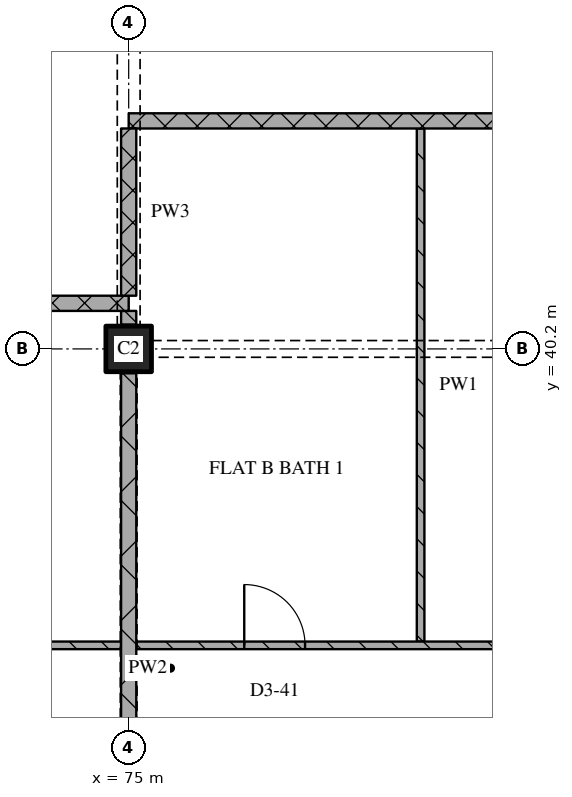
"""IFC4 building model, lengths in metres.
Left out: names, types, materials, properties, quantities, classifications, styles, units other than length and angle.
Written with IfcOpenShell. Run it as: python <this file> out.ifc"""

import sys

from ifc_helpers import new_model, si_unit, direction, frame, frame_2d, origin, origin_2d, place, context, subcontext, project, spatial, rectangle, extrude, element, fill, save


model = new_model("IFC4")
c1 = context("Model", 3, precision=1e-05, world=origin(), true_north=direction((0.0, 1.0)))
c2 = subcontext(c1, "Body", "Model", "MODEL_VIEW")
j1 = project(units=[si_unit("LENGTHUNIT", "METRE"), si_unit("PLANEANGLEUNIT", "RADIAN")], contexts=[c1])
p1 = place(None, origin())
s1 = spatial("IfcSite", under=j1, at=p1, CompositionType="ELEMENT")
p2 = place(p1, origin())
s2 = spatial("IfcBuilding", under=s1, at=p2, CompositionType="ELEMENT")
p3 = place(p2, frame((0.0, 0.0, 230.7)))
s3 = spatial("IfcBuildingStorey", under=s2, at=p3, CompositionType="ELEMENT", Elevation=230.7)
p4 = place(p3, frame((75.0, 40.2, 0.0), z_axis=(0.0, 0.0, 1.0), x_axis=(1.0, 0.0, 0.0)))
e1 = element("IfcColumn", 1, at=p4, inside=s3, PredefinedType="COLUMN", context=c2, shape_type="SweptSolid", body=[
    extrude(rectangle(XDim=0.6, YDim=0.6, at=origin_2d()), origin(), (0.0, 0.0, 1.0), 3.6),
])
p5 = place(p3, frame((75.0, 40.8, 0.0), z_axis=(0.0, 0.0, 1.0), x_axis=(-1.0, 0.0, 0.0)))
e2 = element("IfcWall", 2, at=p5, inside=s3, PredefinedType="PARTITIONING", context=c2, shape_type="SweptSolid", body=[
    extrude(rectangle(XDim=24.38, YDim=0.2, at=frame_2d((12.19, 0.0))), origin(), (0.0, 0.0, 1.0), 3.32),
])
p6 = place(p5, frame((13.45, 0.0, 0.0)))
e3 = element("IfcOpeningElement", 3, at=p6, cuts=e2, PredefinedType="OPENING", context=c2, shape_type="SweptSolid", body=[
    extrude(rectangle(XDim=1.0, YDim=2.1, at=frame_2d((0.5, 1.05))), frame((0.0, 0.11, 0.0), z_axis=(0.0, -1.0, 0.0), x_axis=(1.0, 0.0, 0.0)), (0.0, 0.0, 1.0), 0.22),
])
p7 = place(p3, frame((100.2, 43.2, 0.0), z_axis=(0.0, 0.0, 1.0), x_axis=(-1.0, 0.0, 0.0)))
e4 = element("IfcWall", 4, at=p7, inside=s3, PredefinedType="PARTITIONING", context=c2, shape_type="SweptSolid", body=[
    extrude(rectangle(XDim=25.2, YDim=0.2, at=frame_2d((12.6, 0.0))), origin(), (0.0, 0.0, 1.0), 3.32),
])
p8 = place(p7, frame((13.45, 0.0, 0.0)))
e5 = element("IfcOpeningElement", 5, at=p8, cuts=e4, PredefinedType="OPENING", context=c2, shape_type="SweptSolid", body=[
    extrude(rectangle(XDim=1.0, YDim=2.1, at=frame_2d((0.5, 1.05))), frame((0.0, 0.11, 0.0), z_axis=(0.0, -1.0, 0.0), x_axis=(1.0, 0.0, 0.0)), (0.0, 0.0, 1.0), 0.22),
])
p9 = place(p3, frame((75.0, 43.1, 0.0), z_axis=(0.0, 0.0, 1.0), x_axis=(0.0, -1.0, 0.0)))
e6 = element("IfcWall", 6, at=p9, inside=s3, PredefinedType="PARTITIONING", context=c2, shape_type="SweptSolid", body=[
    extrude(rectangle(XDim=2.2, YDim=0.2, at=frame_2d((1.1, 0.0))), origin(), (0.0, 0.0, 1.0), 2.53),
])
p10 = place(p3, frame((75.0, 39.88, 0.0), z_axis=(0.0, 0.0, 1.0), x_axis=(0.0, -1.0, 0.0)))
e7 = element("IfcWall", 7, at=p10, inside=s3, PredefinedType="PARTITIONING", context=c2, shape_type="SweptSolid", body=[
    extrude(rectangle(XDim=7.76, YDim=0.2, at=frame_2d((3.88, 0.0))), origin(), (0.0, 0.0, 1.0), 2.72),
])
p11 = place(p3, frame((75.0, 40.7, 0.0), z_axis=(0.0, 0.0, 1.0), x_axis=(0.0, -1.0, 0.0)))
e8 = element("IfcWall", 8, at=p11, inside=s3, PredefinedType="PARTITIONING", context=c2, shape_type="SweptSolid", body=[
    extrude(rectangle(XDim=0.18, YDim=0.2, at=frame_2d((0.09, 0.0))), origin(), (0.0, 0.0, 1.0), 3.32),
])
p12 = place(p3, frame((78.841, 43.1, 0.0), z_axis=(0.0, 0.0, 1.0), x_axis=(0.0, -1.0, 0.0)))
e9 = element("IfcWall", 9, at=p12, inside=s3, PredefinedType="PARTITIONING", context=c2, shape_type="SweptSolid", body=[
    extrude(rectangle(XDim=6.75, YDim=0.1, at=frame_2d((3.375, 0.0))), origin(), (0.0, 0.0, 1.0), 3.32),
])
p13 = place(p3, frame((69.3, 36.3, 0.0), z_axis=(0.0, 0.0, 1.0), x_axis=(1.0, 0.0, 0.0)))
e10 = element("IfcWall", 10, at=p13, inside=s3, PredefinedType="PARTITIONING", context=c2, shape_type="SweptSolid", body=[
    extrude(rectangle(XDim=5.6, YDim=0.1, at=frame_2d((2.8, 0.0))), origin(), (0.0, 0.0, 1.0), 3.32),
])
p14 = place(p13, frame((2.4, 0.0, 0.0)))
e11 = element("IfcOpeningElement", 11, at=p14, cuts=e10, PredefinedType="OPENING", context=c2, shape_type="SweptSolid", body=[
    extrude(rectangle(XDim=0.9, YDim=2.1, at=frame_2d((0.45, 1.05))), frame((0.0, 0.06, 0.0), z_axis=(0.0, -1.0, 0.0), x_axis=(1.0, 0.0, 0.0)), (0.0, 0.0, 1.0), 0.12),
])
p15 = place(p3, frame((75.1, 36.3, 0.0), z_axis=(0.0, 0.0, 1.0), x_axis=(1.0, 0.0, 0.0)))
e12 = element("IfcWall", 12, at=p15, inside=s3, PredefinedType="PARTITIONING", context=c2, shape_type="SweptSolid", body=[
    extrude(rectangle(XDim=10.4, YDim=0.1, at=frame_2d((5.2, 0.0))), origin(), (0.0, 0.0, 1.0), 3.32),
])
p16 = place(p15, frame((1.42, 0.0, 0.0)))
e13 = element("IfcOpeningElement", 13, at=p16, cuts=e12, PredefinedType="OPENING", context=c2, shape_type="SweptSolid", body=[
    extrude(rectangle(XDim=0.8, YDim=2.1, at=frame_2d((0.4, 1.05))), frame((0.0, 0.06, 0.0), z_axis=(0.0, -1.0, 0.0), x_axis=(1.0, 0.0, 0.0)), (0.0, 0.0, 1.0), 0.12),
])
p17 = place(p15, frame((5.261, 0.0, 0.0)))
e14 = element("IfcOpeningElement", 14, at=p17, cuts=e12, PredefinedType="OPENING", context=c2, shape_type="SweptSolid", body=[
    extrude(rectangle(XDim=0.8, YDim=2.1, at=frame_2d((0.4, 1.05))), frame((0.0, 0.06, 0.0), z_axis=(0.0, -1.0, 0.0), x_axis=(1.0, 0.0, 0.0)), (0.0, 0.0, 1.0), 0.12),
])
p18 = place(p15, frame((8.541, 0.0, 0.0)))
e15 = element("IfcOpeningElement", 15, at=p18, cuts=e12, PredefinedType="OPENING", context=c2, shape_type="SweptSolid", body=[
    extrude(rectangle(XDim=0.9, YDim=2.1, at=frame_2d((0.45, 1.05))), frame((0.0, 0.06, 0.0), z_axis=(0.0, -1.0, 0.0), x_axis=(1.0, 0.0, 0.0)), (0.0, 0.0, 1.0), 0.12),
])
p19 = place(p16, origin())
e16 = element("IfcDoor", 16, at=p19, inside=s3, OperationType="SINGLE_SWING_LEFT", PredefinedType="DOOR", context=c2, shape_type="SweptSolid", body=[
    extrude(rectangle(XDim=0.8, YDim=2.1, at=frame_2d((0.4, 1.05))), frame((0.0, 0.025, 0.0), z_axis=(0.0, -1.0, 0.0), x_axis=(1.0, 0.0, 0.0)), (0.0, 0.0, 1.0), 0.05),
])
fill(e13, e16)
save(model, sys.argv[1])
